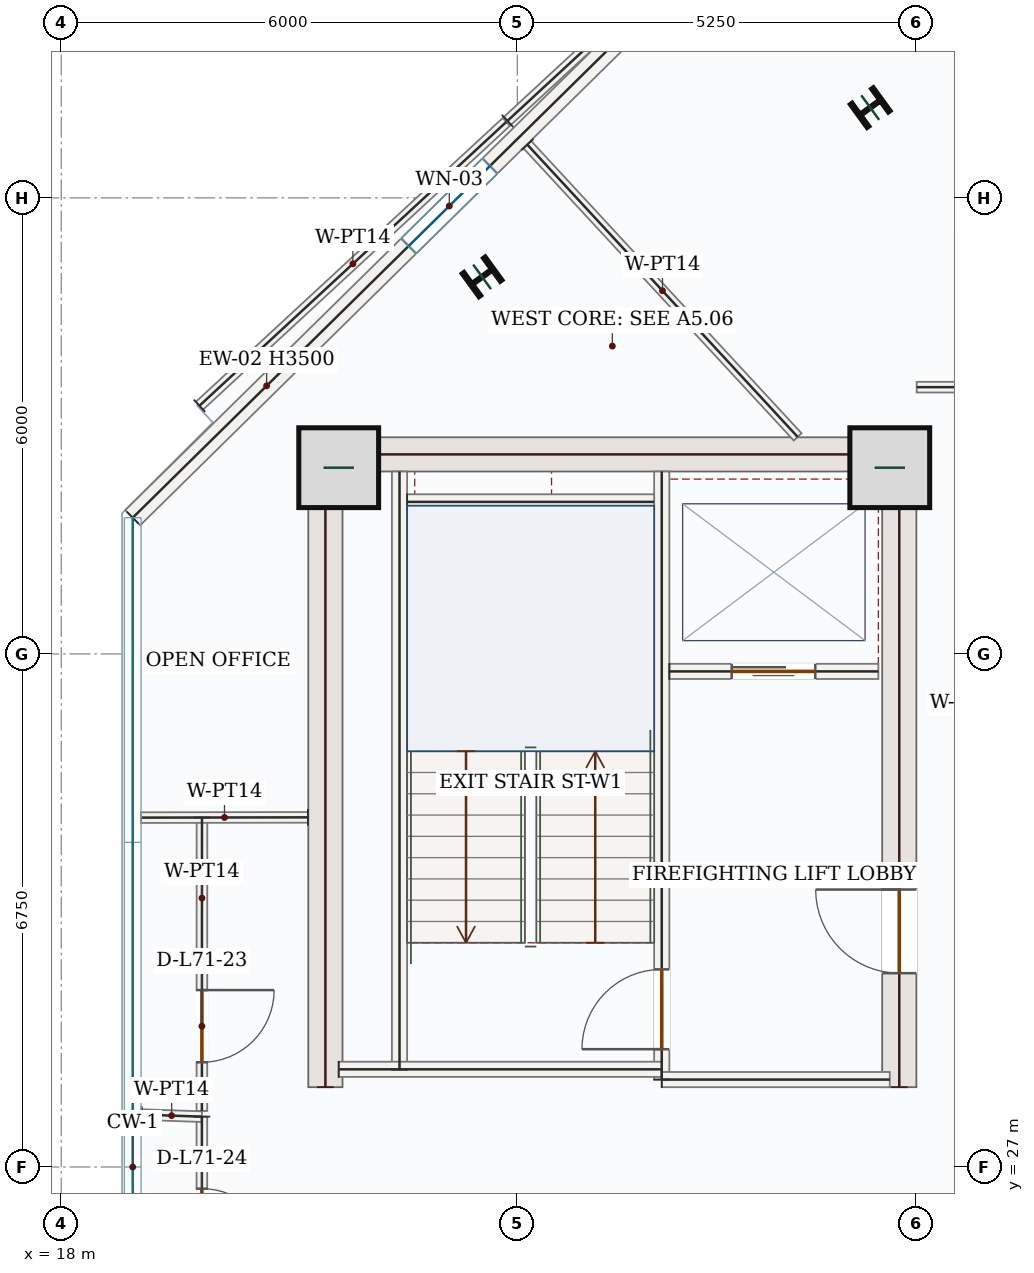
"""IFC4 building model, lengths in metres.
Left out: names, types, materials, properties, quantities, classifications, styles, units other than length and angle.
Written with IfcOpenShell. Run it as: python <this file> out.ifc"""

import sys

from ifc_helpers import new_model, si_unit, direction, frame, frame_2d, origin, origin_2d, place, context, subcontext, project, spatial, rectangle, i_section, extrude, source, transform, mapped, element, fill, save


model = new_model("IFC4")
c1 = context("Model", 3, precision=1e-05, world=origin(), true_north=direction((0.0, 1.0)))
c2 = subcontext(c1, "Body", "Model", "MODEL_VIEW")
j1 = project(units=[si_unit("LENGTHUNIT", "METRE"), si_unit("PLANEANGLEUNIT", "RADIAN")], contexts=[c1])
p1 = place(None, origin())
s1 = spatial("IfcSite", under=j1, at=p1, CompositionType="ELEMENT")
p2 = place(p1, origin())
s2 = spatial("IfcBuilding", under=s1, at=p2, CompositionType="ELEMENT")
p3 = place(p2, frame((0.0, 0.0, 295.35)))
s3 = spatial("IfcBuildingStorey", under=s2, at=p3, CompositionType="ELEMENT", Elevation=295.35)
m1 = source(origin(), c2, "Body", "SweptSolid", [
    extrude(rectangle(XDim=8.55, YDim=0.45, at=frame_2d((4.275, 0.0))), origin(), (0.0, 0.0, 1.0), 3.5),
])
p4 = place(p3, frame((21.475, 28.05, 0.0), z_axis=(0.0, 0.0, 1.0), x_axis=(0.0, 1.0, 0.0)))
e1 = element("IfcWall", 1, at=p4, inside=s3, PredefinedType="SHEAR", context=c2, shape_type="MappedRepresentation", body=[
    mapped(m1, transform((0.0, 0.0, 0.0), x_axis=(1.0, 0.0, 0.0), y_axis=(0.0, 1.0, 0.0), z_axis=(0.0, 0.0, 1.0), scale=1.0)),
])
p5 = place(p3, frame((29.025, 28.05, 0.0), z_axis=(0.0, 0.0, 1.0), x_axis=(0.0, 1.0, 0.0)))
e2 = element("IfcWall", 2, at=p5, inside=s3, PredefinedType="SHEAR", context=c2, shape_type="SweptSolid", body=[
    extrude(rectangle(XDim=8.55, YDim=0.45, at=frame_2d((4.275, 0.0))), origin(), (0.0, 0.0, 1.0), 3.5),
])
p6 = place(p5, frame((1.5, 0.0, 0.0)))
e3 = element("IfcOpeningElement", 3, at=p6, cuts=e2, PredefinedType="OPENING", context=c2, shape_type="SweptSolid", body=[
    extrude(rectangle(XDim=1.1, YDim=2.2, at=frame_2d((0.55, 1.1))), frame((0.0, 0.235, 0.0), z_axis=(0.0, -1.0, 0.0), x_axis=(1.0, 0.0, 0.0)), (0.0, 0.0, 1.0), 0.47),
])
m2 = source(origin(), c2, "Body", "SweptSolid", [
    extrude(rectangle(XDim=7.1, YDim=0.45, at=frame_2d((3.55, 0.0))), origin(), (0.0, 0.0, 1.0), 3.5),
])
p7 = place(p3, frame((21.7, 36.375, 0.0), z_axis=(0.0, 0.0, 1.0), x_axis=(1.0, 0.0, 0.0)))
e4 = element("IfcWall", 4, at=p7, inside=s3, PredefinedType="SHEAR", context=c2, shape_type="MappedRepresentation", body=[
    mapped(m2, transform((0.0, 0.0, 0.0), x_axis=(1.0, 0.0, 0.0), y_axis=(0.0, 1.0, 0.0), z_axis=(0.0, 0.0, 1.0), scale=1.0)),
])
m3 = source(origin(), c2, "Body", "SweptSolid", [
    extrude(rectangle(XDim=1.05, YDim=1.05, at=origin_2d()), origin(), (0.0, 0.0, 1.0), 3.75),
])
for number, where, z_axis, x_axis in (
    (5, (21.65, 36.2, 0.0), (0.0, 0.0, 1.0), (1.0, 0.0, 0.0)),
    (6, (28.9, 36.2, 0.0), (0.0, 0.0, 1.0), (1.0, 0.0, 0.0)),
):
    element("IfcColumn", number, at=place(p3, frame(where, z_axis=z_axis, x_axis=x_axis)), inside=s3, PredefinedType="COLUMN", context=c2, shape_type="MappedRepresentation", body=[
        mapped(m3, transform((0.0, 0.0, 0.0), x_axis=(1.0, 0.0, 0.0), y_axis=(0.0, 1.0, 0.0), z_axis=(0.0, 0.0, 1.0), scale=1.0)),
    ])
m4 = source(origin(), c2, "Body", "SweptSolid", [
    extrude(i_section(OverallWidth=0.374, OverallDepth=0.372, WebThickness=0.016, FlangeThickness=0.026, FilletRadius=0.018, at=origin_2d()), origin(), (0.0, 0.0, 1.0), 3.75),
])
for number, where, z_axis, x_axis in (
    (7, (28.643, 40.937, 0.0), (0.0, 0.0, 1.0), (-0.588, 0.809, 0.0)),
    (8, (23.536, 38.711, 0.0), (0.0, 0.0, 1.0), (-0.588, 0.809, 0.0)),
):
    element("IfcColumn", number, at=place(p3, frame(where, z_axis=z_axis, x_axis=x_axis)), inside=s3, PredefinedType="COLUMN", context=c2, shape_type="MappedRepresentation", body=[
        mapped(m4, transform((0.0, 0.0, 0.0), x_axis=(1.0, 0.0, 0.0), y_axis=(0.0, 1.0, 0.0), z_axis=(0.0, 0.0, 1.0), scale=1.0)),
    ])
p8 = place(p3, frame((18.94, 35.542, 0.0), z_axis=(0.0, 0.0, 1.0), x_axis=(0.712557502542, 0.701613715353, 0.0)))
e9 = element("IfcWall", 9, at=p8, inside=s3, PredefinedType="SOLIDWALL", context=c2, shape_type="SweptSolid", body=[
    extrude(rectangle(XDim=11.69, YDim=0.28, at=frame_2d((5.845, 0.0))), origin(), (0.0, 0.0, 1.0), 3.5),
])
p9 = place(p8, frame((5.095, 0.0, 0.85)))
e10 = element("IfcOpeningElement", 10, at=p9, cuts=e9, PredefinedType="OPENING", context=c2, shape_type="SweptSolid", body=[
    extrude(rectangle(XDim=1.5, YDim=1.5, at=frame_2d((0.75, 0.75))), frame((0.0, 0.15, 0.0), z_axis=(0.0, -1.0, 0.0), x_axis=(1.0, 0.0, 0.0)), (0.0, 0.0, 1.0), 0.3),
])
p10 = place(p3, frame((29.672, 43.65, 0.0), z_axis=(0.0, 0.0, 1.0), x_axis=(0.679010627727, -0.734128440693, 0.0)))
e11 = element("IfcWall", 11, at=p10, inside=s3, PredefinedType="SOLIDWALL", context=c2, shape_type="SweptSolid", body=[
    extrude(rectangle(XDim=5.98, YDim=0.28, at=frame_2d((2.99, 0.0))), origin(), (0.0, 0.0, 1.0), 3.5),
])
p11 = place(p10, frame((2.24, 0.0, 0.85)))
e12 = element("IfcOpeningElement", 12, at=p11, cuts=e11, PredefinedType="OPENING", context=c2, shape_type="SweptSolid", body=[
    extrude(rectangle(XDim=1.5, YDim=1.5, at=frame_2d((0.75, 0.75))), frame((0.0, 0.15, 0.0), z_axis=(0.0, -1.0, 0.0), x_axis=(1.0, 0.0, 0.0)), (0.0, 0.0, 1.0), 0.3),
])
m5 = source(origin(), c2, "Body", "SweptSolid", [
    extrude(rectangle(XDim=7.87, YDim=0.2, at=frame_2d((3.935, 0.0))), origin(), (0.0, 0.0, 1.0), 3.5),
])
p12 = place(p3, frame((22.45, 28.28, 0.0), z_axis=(0.0, 0.0, 1.0), x_axis=(0.0, 1.0, 0.0)))
e13 = element("IfcWall", 13, at=p12, inside=s3, PredefinedType="SOLIDWALL", context=c2, shape_type="MappedRepresentation", body=[
    mapped(m5, transform((0.0, 0.0, 0.0), x_axis=(1.0, 0.0, 0.0), y_axis=(0.0, 1.0, 0.0), z_axis=(0.0, 0.0, 1.0), scale=1.0)),
])
p13 = place(p3, frame((25.9, 28.15, 0.0), z_axis=(0.0, 0.0, 1.0), x_axis=(0.0, 1.0, 0.0)))
e14 = element("IfcWall", 14, at=p13, inside=s3, PredefinedType="SOLIDWALL", context=c2, shape_type="SweptSolid", body=[
    extrude(rectangle(XDim=8.0, YDim=0.2, at=frame_2d((4.0, 0.0))), origin(), (0.0, 0.0, 1.0), 3.5),
])
p14 = place(p13, frame((0.4, 0.0, 0.0)))
e15 = element("IfcOpeningElement", 15, at=p14, cuts=e14, PredefinedType="OPENING", context=c2, shape_type="SweptSolid", body=[
    extrude(rectangle(XDim=1.05, YDim=2.15, at=frame_2d((0.525, 1.075))), frame((0.0, 0.11, 0.0), z_axis=(0.0, -1.0, 0.0), x_axis=(1.0, 0.0, 0.0)), (0.0, 0.0, 1.0), 0.22),
])
m6 = source(origin(), c2, "Body", "SweptSolid", [
    extrude(rectangle(XDim=4.25, YDim=0.2, at=frame_2d((2.125, 0.0))), origin(), (0.0, 0.0, 1.0), 3.5),
])
p15 = place(p3, frame((21.65, 28.285, 0.0), z_axis=(0.0, 0.0, 1.0), x_axis=(1.0, 0.0, 0.0)))
e16 = element("IfcWall", 16, at=p15, inside=s3, PredefinedType="SOLIDWALL", context=c2, shape_type="MappedRepresentation", body=[
    mapped(m6, transform((0.0, 0.0, 0.0), x_axis=(1.0, 0.0, 0.0), y_axis=(0.0, 1.0, 0.0), z_axis=(0.0, 0.0, 1.0), scale=1.0)),
])
m7 = source(origin(), c2, "Body", "SweptSolid", [
    extrude(rectangle(XDim=3.0, YDim=0.2, at=frame_2d((1.5, 0.0))), origin(), (0.0, 0.0, 1.0), 3.5),
])
p16 = place(p3, frame((25.9, 28.15, 0.0), z_axis=(0.0, 0.0, 1.0), x_axis=(1.0, 0.0, 0.0)))
e17 = element("IfcWall", 17, at=p16, inside=s3, PredefinedType="SOLIDWALL", context=c2, shape_type="MappedRepresentation", body=[
    mapped(m7, transform((0.0, 0.0, 0.0), x_axis=(1.0, 0.0, 0.0), y_axis=(0.0, 1.0, 0.0), z_axis=(0.0, 0.0, 1.0), scale=1.0)),
])
m8 = source(origin(), c2, "Body", "SweptSolid", [
    extrude(rectangle(XDim=3.25, YDim=0.2, at=frame_2d((1.625, 0.0))), origin(), (0.0, 0.0, 1.0), 3.5),
])
p17 = place(p3, frame((22.55, 35.75, 0.0), z_axis=(0.0, 0.0, 1.0), x_axis=(1.0, 0.0, 0.0)))
e18 = element("IfcWall", 18, at=p17, inside=s3, PredefinedType="SOLIDWALL", context=c2, shape_type="MappedRepresentation", body=[
    mapped(m8, transform((0.0, 0.0, 0.0), x_axis=(1.0, 0.0, 0.0), y_axis=(0.0, 1.0, 0.0), z_axis=(0.0, 0.0, 1.0), scale=1.0)),
])
p18 = place(p3, frame((26.0, 33.52, 0.0), z_axis=(0.0, 0.0, 1.0), x_axis=(1.0, 0.0, 0.0)))
e19 = element("IfcWall", 19, at=p18, inside=s3, PredefinedType="SOLIDWALL", context=c2, shape_type="SweptSolid", body=[
    extrude(rectangle(XDim=2.75, YDim=0.2, at=frame_2d((1.375, 0.0))), origin(), (0.0, 0.0, 1.0), 3.5),
])
p19 = place(p18, frame((0.82, 0.0, 0.0)))
e20 = element("IfcOpeningElement", 20, at=p19, cuts=e19, PredefinedType="OPENING", context=c2, shape_type="SweptSolid", body=[
    extrude(rectangle(XDim=1.1, YDim=2.15, at=frame_2d((0.55, 1.075))), frame((0.0, 0.11, 0.0), z_axis=(0.0, -1.0, 0.0), x_axis=(1.0, 0.0, 0.0)), (0.0, 0.0, 1.0), 0.22),
])
p20 = place(p3, frame((19.85, 27.662, 0.0), z_axis=(0.0, 0.0, 1.0), x_axis=(0.0, -1.0, 0.0)))
e21 = element("IfcWall", 21, at=p20, inside=s3, PredefinedType="PARTITIONING", context=c2, shape_type="SweptSolid", body=[
    extrude(rectangle(XDim=5.256, YDim=0.14, at=frame_2d((2.628, 0.0))), origin(), (0.0, 0.0, 1.0), 3.5),
])
p21 = place(p20, frame((0.948, 0.0, 0.0)))
e22 = element("IfcOpeningElement", 22, at=p21, cuts=e21, PredefinedType="OPENING", context=c2, shape_type="SweptSolid", body=[
    extrude(rectangle(XDim=0.95, YDim=2.15, at=frame_2d((0.475, 1.075))), frame((0.0, 0.08, 0.0), z_axis=(0.0, -1.0, 0.0), x_axis=(1.0, 0.0, 0.0)), (0.0, 0.0, 1.0), 0.16),
])
m9 = source(origin(), c2, "Body", "SweptSolid", [
    extrude(rectangle(XDim=0.795, YDim=0.14, at=frame_2d((0.397, 0.0))), origin(), (0.0, 0.0, 1.0), 3.5),
])
p22 = place(p3, frame((19.055, 27.689, 0.0), z_axis=(0.0, 0.0, 1.0), x_axis=(0.999418697686, -0.034092033019, 0.0)))
e23 = element("IfcWall", 23, at=p22, inside=s3, PredefinedType="PARTITIONING", context=c2, shape_type="MappedRepresentation", body=[
    mapped(m9, transform((0.0, 0.0, 0.0), x_axis=(1.0, 0.0, 0.0), y_axis=(0.0, 1.0, 0.0), z_axis=(0.0, 0.0, 1.0), scale=1.0)),
])
p23 = place(p3, frame((19.851, 31.598, 0.0), z_axis=(0.0, 0.0, 1.0), x_axis=(-0.000316215517, -0.999999950004, 0.0)))
e24 = element("IfcWall", 24, at=p23, inside=s3, PredefinedType="PARTITIONING", context=c2, shape_type="SweptSolid", body=[
    extrude(rectangle(XDim=3.86, YDim=0.14, at=frame_2d((1.93, 0.0))), origin(), (0.0, 0.0, 1.0), 3.5),
])
p24 = place(p23, frame((2.27, 0.0, 0.0)))
e25 = element("IfcOpeningElement", 25, at=p24, cuts=e24, PredefinedType="OPENING", context=c2, shape_type="SweptSolid", body=[
    extrude(rectangle(XDim=0.95, YDim=2.15, at=frame_2d((0.475, 1.075))), frame((0.0, 0.08, 0.0), z_axis=(0.0, -1.0, 0.0), x_axis=(1.0, 0.0, 0.0)), (0.0, 0.0, 1.0), 0.16),
])
m10 = source(origin(), c2, "Body", "SweptSolid", [
    extrude(rectangle(XDim=5.5, YDim=0.14, at=frame_2d((2.75, 0.0))), origin(), (0.0, 0.0, 1.0), 3.5),
])
p25 = place(p3, frame((19.818, 37.015, 0.0), z_axis=(0.0, 0.0, 1.0), x_axis=(0.734137611872, 0.679000711954, 0.0)))
e26 = element("IfcWall", 26, at=p25, inside=s3, PredefinedType="PARTITIONING", context=c2, shape_type="MappedRepresentation", body=[
    mapped(m10, transform((0.0, 0.0, 0.0), x_axis=(1.0, 0.0, 0.0), y_axis=(0.0, 1.0, 0.0), z_axis=(0.0, 0.0, 1.0), scale=1.0)),
])
m11 = source(origin(), c2, "Body", "SweptSolid", [
    extrude(rectangle(XDim=5.238, YDim=0.14, at=frame_2d((2.619, 0.0))), origin(), (0.0, 0.0, 1.0), 3.5),
])
p26 = place(p3, frame((24.132, 40.45, 0.0), z_axis=(0.0, 0.0, 1.0), x_axis=(0.67899802156, -0.734140100197, 0.0)))
e27 = element("IfcWall", 27, at=p26, inside=s3, PredefinedType="PARTITIONING", context=c2, shape_type="MappedRepresentation", body=[
    mapped(m11, transform((0.0, 0.0, 0.0), x_axis=(1.0, 0.0, 0.0), y_axis=(0.0, 1.0, 0.0), z_axis=(0.0, 0.0, 1.0), scale=1.0)),
])
m12 = source(origin(), c2, "Body", "SweptSolid", [
    extrude(rectangle(XDim=2.195, YDim=0.14, at=frame_2d((1.098, 0.0))), origin(), (0.0, 0.0, 1.0), 3.5),
])
p27 = place(p3, frame((21.245, 31.6, 0.0), z_axis=(0.0, 0.0, 1.0), x_axis=(-0.999998787702, -0.001557110781, 0.0)))
e28 = element("IfcWall", 28, at=p27, inside=s3, PredefinedType="PARTITIONING", context=c2, shape_type="MappedRepresentation", body=[
    mapped(m12, transform((0.0, 0.0, 0.0), x_axis=(1.0, 0.0, 0.0), y_axis=(0.0, 1.0, 0.0), z_axis=(0.0, 0.0, 1.0), scale=1.0)),
])
m13 = source(origin(), c2, "Body", "SweptSolid", [
    extrude(rectangle(XDim=3.722, YDim=0.14, at=frame_2d((1.861, 0.0))), origin(), (0.0, 0.0, 1.0), 3.5),
])
p28 = place(p3, frame((23.87, 40.763, 0.0), z_axis=(0.0, 0.0, 1.0), x_axis=(0.734119057589, 0.679020772352, 0.0)))
e29 = element("IfcWall", 29, at=p28, inside=s3, PredefinedType="PARTITIONING", context=c2, shape_type="MappedRepresentation", body=[
    mapped(m13, transform((0.0, 0.0, 0.0), x_axis=(1.0, 0.0, 0.0), y_axis=(0.0, 1.0, 0.0), z_axis=(0.0, 0.0, 1.0), scale=1.0)),
])
p29 = place(p3, frame((36.39, 37.26, 0.0), z_axis=(0.0, 0.0, 1.0), x_axis=(-0.999999997659, -6.8420512e-05, 0.0)))
e30 = element("IfcWall", 30, at=p29, inside=s3, PredefinedType="PARTITIONING", context=c2, shape_type="SweptSolid", body=[
    extrude(rectangle(XDim=7.136, YDim=0.14, at=frame_2d((3.568, 0.0))), origin(), (0.0, 0.0, 1.0), 3.5),
])
p30 = place(p29, frame((1.361, 0.0, 0.0)))
e31 = element("IfcOpeningElement", 31, at=p30, cuts=e30, PredefinedType="OPENING", context=c2, shape_type="SweptSolid", body=[
    extrude(rectangle(XDim=0.95, YDim=2.15, at=frame_2d((0.475, 1.075))), frame((0.0, 0.08, 0.0), z_axis=(0.0, -1.0, 0.0), x_axis=(1.0, 0.0, 0.0)), (0.0, 0.0, 1.0), 0.16),
])
m14 = source(origin(), c2, "Body", "SweptSolid", [
    extrude(rectangle(XDim=1.5, YDim=1.5, at=frame_2d((0.75, 0.75))), frame((0.0, 0.03, 0.0), z_axis=(0.0, -1.0, 0.0), x_axis=(1.0, 0.0, 0.0)), (0.0, 0.0, 1.0), 0.06),
])
p31 = place(p9, origin())
e32 = element("IfcWindow", 32, at=p31, inside=s3, PartitioningType="SINGLE_PANEL", PredefinedType="WINDOW", context=c2, shape_type="MappedRepresentation", body=[
    mapped(m14, transform((0.0, 0.0, 0.0), x_axis=(1.0, 0.0, 0.0), y_axis=(0.0, 1.0, 0.0), z_axis=(0.0, 0.0, 1.0), scale=1.0)),
])
fill(e10, e32)
m15 = source(origin(), c2, "Body", "SweptSolid", [
    extrude(rectangle(XDim=1.05, YDim=2.15, at=frame_2d((0.525, 1.075))), frame((0.0, 0.025, 0.0), z_axis=(0.0, -1.0, 0.0), x_axis=(1.0, 0.0, 0.0)), (0.0, 0.0, 1.0), 0.05),
])
p32 = place(p14, origin())
e33 = element("IfcDoor", 33, at=p32, inside=s3, OperationType="SINGLE_SWING_LEFT", PredefinedType="DOOR", context=c2, shape_type="MappedRepresentation", body=[
    mapped(m15, transform((0.0, 0.0, 0.0), x_axis=(1.0, 0.0, 0.0), y_axis=(0.0, 1.0, 0.0), z_axis=(0.0, 0.0, 1.0), scale=1.0)),
])
fill(e15, e33)
m16 = source(origin(), c2, "Body", "SweptSolid", [
    extrude(rectangle(XDim=1.1, YDim=2.15, at=frame_2d((0.55, 1.075))), frame((0.0, 0.025, 0.0), z_axis=(0.0, -1.0, 0.0), x_axis=(1.0, 0.0, 0.0)), (0.0, 0.0, 1.0), 0.05),
])
p33 = place(p19, origin())
e34 = element("IfcDoor", 34, at=p33, inside=s3, OperationType="DOUBLE_DOOR_SLIDING", PredefinedType="DOOR", context=c2, shape_type="MappedRepresentation", body=[
    mapped(m16, transform((0.0, 0.0, 0.0), x_axis=(1.0, 0.0, 0.0), y_axis=(0.0, 1.0, 0.0), z_axis=(0.0, 0.0, 1.0), scale=1.0)),
])
fill(e20, e34)
m17 = source(origin(), c2, "Body", "SweptSolid", [
    extrude(rectangle(XDim=1.1, YDim=2.2, at=frame_2d((0.55, 1.1))), frame((0.0, 0.025, 0.0), z_axis=(0.0, -1.0, 0.0), x_axis=(1.0, 0.0, 0.0)), (0.0, 0.0, 1.0), 0.05),
])
p34 = place(p6, origin())
e35 = element("IfcDoor", 35, at=p34, inside=s3, OperationType="SINGLE_SWING_RIGHT", PredefinedType="DOOR", context=c2, shape_type="MappedRepresentation", body=[
    mapped(m17, transform((0.0, 0.0, 0.0), x_axis=(1.0, 0.0, 0.0), y_axis=(0.0, 1.0, 0.0), z_axis=(0.0, 0.0, 1.0), scale=1.0)),
])
fill(e3, e35)
m18 = source(origin(), c2, "Body", "SweptSolid", [
    extrude(rectangle(XDim=0.95, YDim=2.15, at=frame_2d((0.475, 1.075))), frame((0.0, 0.025, 0.0), z_axis=(0.0, -1.0, 0.0), x_axis=(1.0, 0.0, 0.0)), (0.0, 0.0, 1.0), 0.05),
])
p35 = place(p24, origin())
e36 = element("IfcDoor", 36, at=p35, inside=s3, OperationType="SINGLE_SWING_LEFT", PredefinedType="DOOR", context=c2, shape_type="MappedRepresentation", body=[
    mapped(m18, transform((0.0, 0.0, 0.0), x_axis=(1.0, 0.0, 0.0), y_axis=(0.0, 1.0, 0.0), z_axis=(0.0, 0.0, 1.0), scale=1.0)),
])
fill(e25, e36)
p36 = place(p21, origin())
e37 = element("IfcDoor", 37, at=p36, inside=s3, OperationType="SINGLE_SWING_RIGHT", PredefinedType="DOOR", context=c2, shape_type="MappedRepresentation", body=[
    mapped(m18, transform((0.0, 0.0, 0.0), x_axis=(1.0, 0.0, 0.0), y_axis=(0.0, 1.0, 0.0), z_axis=(0.0, 0.0, 1.0), scale=1.0)),
])
fill(e22, e37)
save(model, sys.argv[1])
